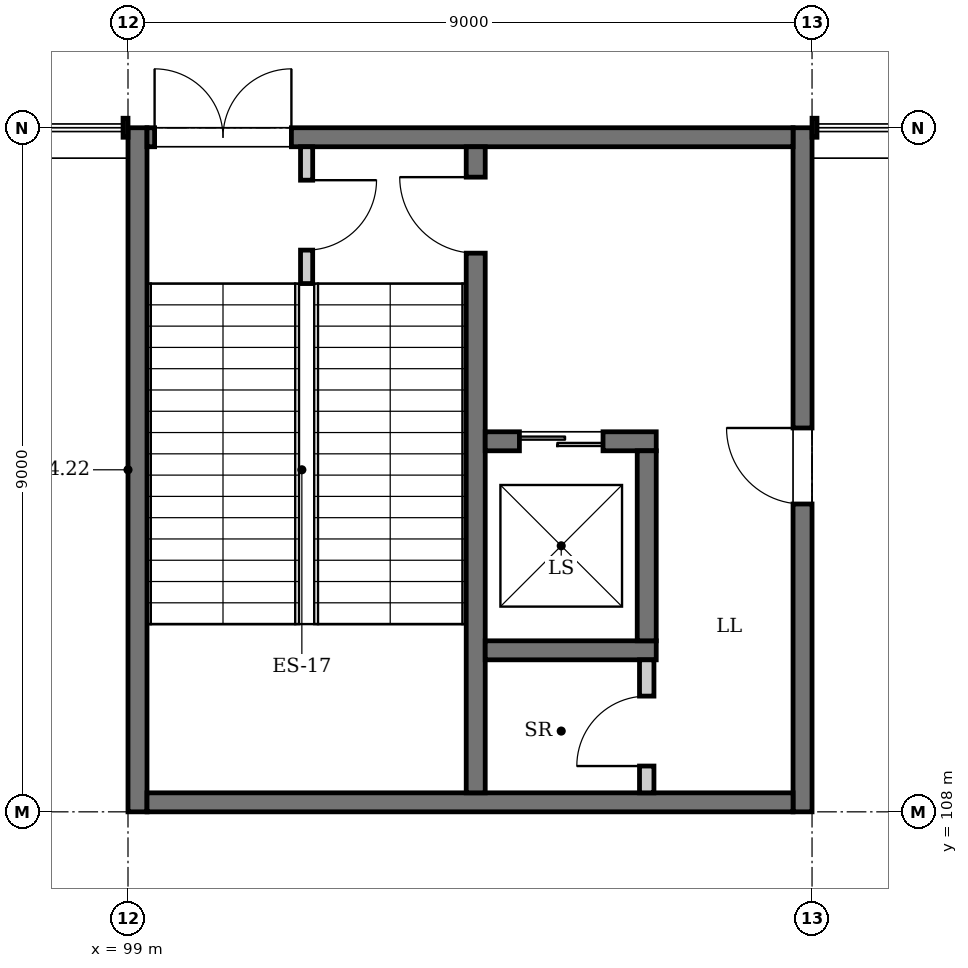
"""IFC4 building model, lengths in metres.
Left out: names, types, materials, properties, quantities, classifications, styles, units other than length and angle.
Written with IfcOpenShell. Run it as: python <this file> out.ifc"""

import sys

from ifc_helpers import new_model, si_unit, direction, frame, frame_2d, origin, place, context, subcontext, project, spatial, rectangle, extrude, element, fill, save


model = new_model("IFC4")
c1 = context("Model", 3, precision=1e-05, world=origin(), true_north=direction((0.0, 1.0)))
c2 = subcontext(c1, "Body", "Model", "MODEL_VIEW")
j1 = project(units=[si_unit("LENGTHUNIT", "METRE"), si_unit("PLANEANGLEUNIT", "RADIAN")], contexts=[c1])
p1 = place(None, origin())
s1 = spatial("IfcSite", under=j1, at=p1, CompositionType="ELEMENT")
p2 = place(p1, origin())
s2 = spatial("IfcBuilding", under=s1, at=p2, CompositionType="ELEMENT")
p3 = place(p2, origin())
s3 = spatial("IfcBuildingStorey", under=s2, at=p3, CompositionType="ELEMENT", Elevation=0.0)
p4 = place(p3, frame((99.125, 108.0, 0.0), z_axis=(0.0, 0.0, 1.0), x_axis=(0.0, 1.0, 0.0)))
e1 = element("IfcWall", 1, at=p4, inside=s3, PredefinedType="SHEAR", context=c2, shape_type="SweptSolid", body=[
    extrude(rectangle(XDim=9.0, YDim=0.25, at=frame_2d((4.5, 0.0))), origin(), (0.0, 0.0, 1.0), 6.0),
])
p5 = place(p3, frame((107.875, 108.0, 0.0), z_axis=(0.0, 0.0, 1.0), x_axis=(0.0, 1.0, 0.0)))
e2 = element("IfcWall", 2, at=p5, inside=s3, PredefinedType="SHEAR", context=c2, shape_type="SweptSolid", body=[
    extrude(rectangle(XDim=9.0, YDim=0.25, at=frame_2d((4.5, 0.0))), origin(), (0.0, 0.0, 1.0), 6.0),
])
p6 = place(p5, frame((4.05, 0.0, 0.0)))
e3 = element("IfcOpeningElement", 3, at=p6, cuts=e2, PredefinedType="OPENING", context=c2, shape_type="SweptSolid", body=[
    extrude(rectangle(XDim=1.0, YDim=2.1, at=frame_2d((0.5, 1.05))), frame((0.0, 0.135, 0.0), z_axis=(0.0, -1.0, 0.0), x_axis=(1.0, 0.0, 0.0)), (0.0, 0.0, 1.0), 0.27),
])
p7 = place(p3, frame((99.25, 108.125, 0.0), z_axis=(0.0, 0.0, 1.0), x_axis=(1.0, 0.0, 0.0)))
e4 = element("IfcWall", 4, at=p7, inside=s3, PredefinedType="SHEAR", context=c2, shape_type="SweptSolid", body=[
    extrude(rectangle(XDim=8.5, YDim=0.25, at=frame_2d((4.25, 0.0))), origin(), (0.0, 0.0, 1.0), 6.0),
])
p8 = place(p3, frame((99.25, 116.875, 0.0), z_axis=(0.0, 0.0, 1.0), x_axis=(1.0, 0.0, 0.0)))
e5 = element("IfcWall", 5, at=p8, inside=s3, PredefinedType="SHEAR", context=c2, shape_type="SweptSolid", body=[
    extrude(rectangle(XDim=8.5, YDim=0.25, at=frame_2d((4.25, 0.0))), origin(), (0.0, 0.0, 1.0), 6.0),
])
p9 = place(p8, frame((0.1, 0.0, 0.0)))
e6 = element("IfcOpeningElement", 6, at=p9, cuts=e5, PredefinedType="OPENING", context=c2, shape_type="SweptSolid", body=[
    extrude(rectangle(XDim=1.8, YDim=2.4, at=frame_2d((0.9, 1.2))), frame((0.0, 0.135, 0.0), z_axis=(0.0, -1.0, 0.0), x_axis=(1.0, 0.0, 0.0)), (0.0, 0.0, 1.0), 0.27),
])
p10 = place(p3, frame((103.575, 116.75, 0.0), z_axis=(0.0, 0.0, 1.0), x_axis=(0.0, -1.0, 0.0)))
e7 = element("IfcWall", 7, at=p10, inside=s3, PredefinedType="SOLIDWALL", context=c2, shape_type="SweptSolid", body=[
    extrude(rectangle(XDim=8.5, YDim=0.25, at=frame_2d((4.25, 0.0))), origin(), (0.0, 0.0, 1.0), 5.75),
])
p11 = place(p10, frame((0.4, 0.0, 0.0)))
e8 = element("IfcOpeningElement", 8, at=p11, cuts=e7, PredefinedType="OPENING", context=c2, shape_type="SweptSolid", body=[
    extrude(rectangle(XDim=1.0, YDim=2.1, at=frame_2d((0.5, 1.05))), frame((0.0, 0.135, 0.0), z_axis=(0.0, -1.0, 0.0), x_axis=(1.0, 0.0, 0.0)), (0.0, 0.0, 1.0), 0.27),
])
p12 = place(p3, frame((103.7, 110.125, 0.0), z_axis=(0.0, 0.0, 1.0), x_axis=(1.0, 0.0, 0.0)))
e9 = element("IfcWall", 9, at=p12, inside=s3, PredefinedType="SOLIDWALL", context=c2, shape_type="SweptSolid", body=[
    extrude(rectangle(XDim=2.25, YDim=0.25, at=frame_2d((1.125, 0.0))), origin(), (0.0, 0.0, 1.0), 6.0),
])
p13 = place(p3, frame((103.7, 112.875, 0.0), z_axis=(0.0, 0.0, 1.0), x_axis=(1.0, 0.0, 0.0)))
e10 = element("IfcWall", 10, at=p13, inside=s3, PredefinedType="SOLIDWALL", context=c2, shape_type="SweptSolid", body=[
    extrude(rectangle(XDim=2.25, YDim=0.25, at=frame_2d((1.125, 0.0))), origin(), (0.0, 0.0, 1.0), 6.0),
])
p14 = place(p13, frame((0.45, 0.0, 0.0)))
e11 = element("IfcOpeningElement", 11, at=p14, cuts=e10, PredefinedType="OPENING", context=c2, shape_type="SweptSolid", body=[
    extrude(rectangle(XDim=1.1, YDim=2.1, at=frame_2d((0.55, 1.05))), frame((0.0, 0.135, 0.0), z_axis=(0.0, -1.0, 0.0), x_axis=(1.0, 0.0, 0.0)), (0.0, 0.0, 1.0), 0.27),
])
p15 = place(p3, frame((105.825, 110.25, 0.0), z_axis=(0.0, 0.0, 1.0), x_axis=(0.0, 1.0, 0.0)))
e12 = element("IfcWall", 12, at=p15, inside=s3, PredefinedType="SOLIDWALL", context=c2, shape_type="SweptSolid", body=[
    extrude(rectangle(XDim=2.5, YDim=0.25, at=frame_2d((1.25, 0.0))), origin(), (0.0, 0.0, 1.0), 6.0),
])
p16 = place(p3, frame((101.35, 116.75, 0.0), z_axis=(0.0, 0.0, 1.0), x_axis=(0.0, -1.0, 0.0)))
e13 = element("IfcWall", 13, at=p16, inside=s3, PredefinedType="PARTITIONING", context=c2, shape_type="SweptSolid", body=[
    extrude(rectangle(XDim=1.8, YDim=0.16, at=frame_2d((0.9, 0.0))), origin(), (0.0, 0.0, 1.0), 5.75),
])
p17 = place(p16, frame((0.44, 0.0, 0.0)))
e14 = element("IfcOpeningElement", 14, at=p17, cuts=e13, PredefinedType="OPENING", context=c2, shape_type="SweptSolid", body=[
    extrude(rectangle(XDim=0.92, YDim=2.1, at=frame_2d((0.46, 1.05))), frame((0.0, 0.09, 0.0), z_axis=(0.0, -1.0, 0.0), x_axis=(1.0, 0.0, 0.0)), (0.0, 0.0, 1.0), 0.18),
])
p18 = place(p3, frame((105.825, 108.25, 0.0), z_axis=(0.0, 0.0, 1.0), x_axis=(0.0, 1.0, 0.0)))
e15 = element("IfcWall", 15, at=p18, inside=s3, PredefinedType="PARTITIONING", context=c2, shape_type="SweptSolid", body=[
    extrude(rectangle(XDim=1.75, YDim=0.19, at=frame_2d((0.875, 0.0))), origin(), (0.0, 0.0, 1.0), 5.75),
])
p19 = place(p18, frame((0.353, 0.0, 0.0)))
e16 = element("IfcOpeningElement", 16, at=p19, cuts=e15, PredefinedType="OPENING", context=c2, shape_type="SweptSolid", body=[
    extrude(rectangle(XDim=0.92, YDim=2.1, at=frame_2d((0.46, 1.05))), frame((0.0, 0.105, 0.0), z_axis=(0.0, -1.0, 0.0), x_axis=(1.0, 0.0, 0.0)), (0.0, 0.0, 1.0), 0.21),
])
p20 = place(p9, origin())
e17 = element("IfcDoor", 17, at=p20, inside=s3, OperationType="DOUBLE_DOOR_SINGLE_SWING", PredefinedType="DOOR", context=c2, shape_type="SweptSolid", body=[
    extrude(rectangle(XDim=1.8, YDim=2.4, at=frame_2d((0.9, 1.2))), frame((0.0, 0.025, 0.0), z_axis=(0.0, -1.0, 0.0), x_axis=(1.0, 0.0, 0.0)), (0.0, 0.0, 1.0), 0.05),
])
fill(e6, e17)
p21 = place(p14, origin())
e18 = element("IfcDoor", 18, at=p21, inside=s3, OperationType="DOUBLE_DOOR_SLIDING", PredefinedType="DOOR", context=c2, shape_type="SweptSolid", body=[
    extrude(rectangle(XDim=1.1, YDim=2.1, at=frame_2d((0.55, 1.05))), frame((0.0, 0.025, 0.0), z_axis=(0.0, -1.0, 0.0), x_axis=(1.0, 0.0, 0.0)), (0.0, 0.0, 1.0), 0.05),
])
fill(e11, e18)
p22 = place(p11, frame((1.0, 0.0, 0.0), z_axis=(0.0, 0.0, 1.0), x_axis=(-1.0, 0.0, 0.0)))
e19 = element("IfcDoor", 19, at=p22, inside=s3, OperationType="SINGLE_SWING_RIGHT", PredefinedType="DOOR", context=c2, shape_type="SweptSolid", body=[
    extrude(rectangle(XDim=1.0, YDim=2.1, at=frame_2d((0.5, 1.05))), frame((0.0, 0.025, 0.0), z_axis=(0.0, -1.0, 0.0), x_axis=(1.0, 0.0, 0.0)), (0.0, 0.0, 1.0), 0.05),
])
fill(e8, e19)
p23 = place(p19, origin())
e20 = element("IfcDoor", 20, at=p23, inside=s3, OperationType="SINGLE_SWING_LEFT", PredefinedType="DOOR", context=c2, shape_type="SweptSolid", body=[
    extrude(rectangle(XDim=0.92, YDim=2.1, at=frame_2d((0.46, 1.05))), frame((0.0, 0.025, 0.0), z_axis=(0.0, -1.0, 0.0), x_axis=(1.0, 0.0, 0.0)), (0.0, 0.0, 1.0), 0.05),
])
fill(e16, e20)
p24 = place(p17, origin())
e21 = element("IfcDoor", 21, at=p24, inside=s3, OperationType="SINGLE_SWING_LEFT", PredefinedType="DOOR", context=c2, shape_type="SweptSolid", body=[
    extrude(rectangle(XDim=0.92, YDim=2.1, at=frame_2d((0.46, 1.05))), frame((0.0, 0.025, 0.0), z_axis=(0.0, -1.0, 0.0), x_axis=(1.0, 0.0, 0.0)), (0.0, 0.0, 1.0), 0.05),
])
fill(e14, e21)
p25 = place(p6, origin())
e22 = element("IfcDoor", 22, at=p25, inside=s3, OperationType="SINGLE_SWING_RIGHT", PredefinedType="DOOR", context=c2, shape_type="SweptSolid", body=[
    extrude(rectangle(XDim=1.0, YDim=2.1, at=frame_2d((0.5, 1.05))), frame((0.0, 0.025, 0.0), z_axis=(0.0, -1.0, 0.0), x_axis=(1.0, 0.0, 0.0)), (0.0, 0.0, 1.0), 0.05),
])
fill(e3, e22)
save(model, sys.argv[1])
